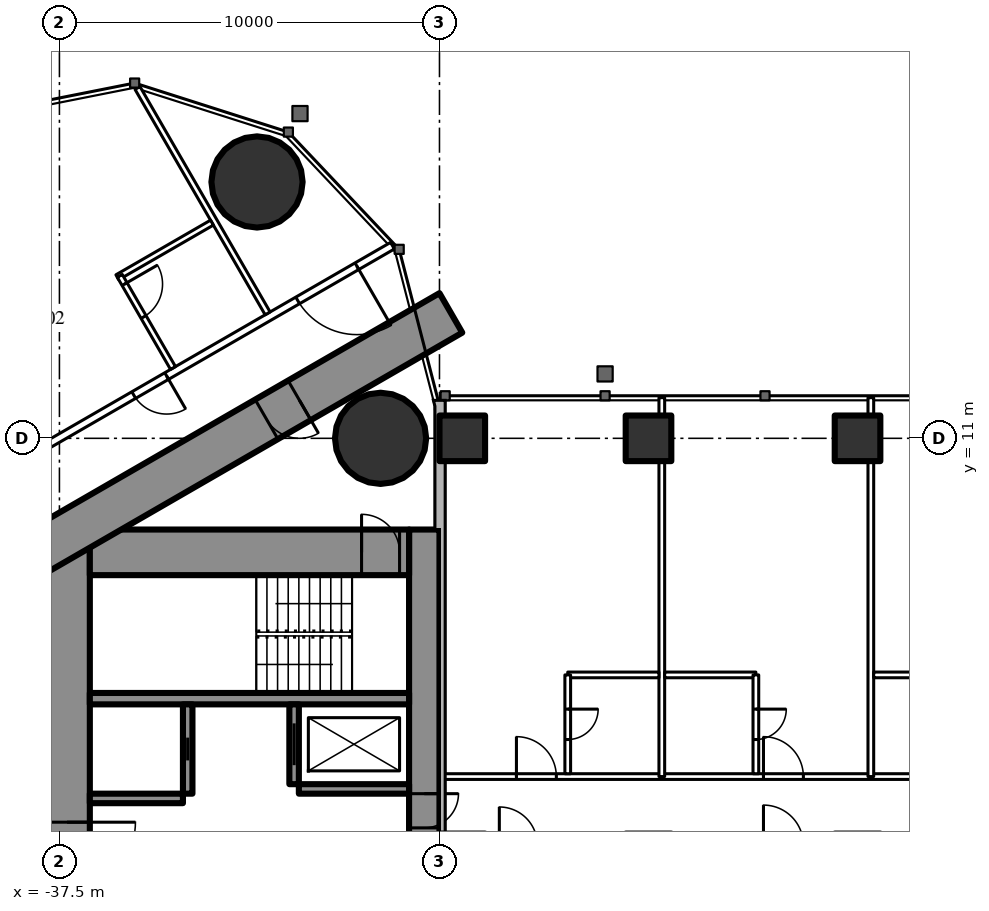
"""IFC4 building model, lengths in metres.
Left out: names, types, materials, properties, quantities, classifications, styles, units other than length and angle.
Written with IfcOpenShell. Run it as: python <this file> out.ifc"""

import sys

from ifc_helpers import new_model, si_unit, direction, frame, frame_2d, origin, origin_2d, place, context, subcontext, project, spatial, rectangle, hollow_rectangle, circle, extrude, element, fill, save


model = new_model("IFC4")
c1 = context("Model", 3, precision=1e-05, world=origin(), true_north=direction((0.0, 1.0)))
c2 = subcontext(c1, "Body", "Model", "MODEL_VIEW")
j1 = project(units=[si_unit("LENGTHUNIT", "METRE"), si_unit("PLANEANGLEUNIT", "RADIAN")], contexts=[c1])
p1 = place(None, origin())
s1 = spatial("IfcSite", under=j1, at=p1, CompositionType="ELEMENT")
p2 = place(p1, origin())
s2 = spatial("IfcBuilding", under=s1, at=p2, CompositionType="ELEMENT")
p3 = place(p2, frame((0.0, 0.0, 215.3)))
s3 = spatial("IfcBuildingStorey", under=s2, at=p3, CompositionType="ELEMENT", Elevation=215.3)
for number, where, z_axis, x_axis in (
    (1, (-32.301, 17.745, 0.0), (0.0, 0.0, 1.0), (1.0, 0.0, 0.0)),
    (2, (-29.05, 11.0, 0.0), (0.0, 0.0, 1.0), (1.0, 0.0, 0.0)),
):
    element("IfcColumn", number, at=place(p3, frame(where, z_axis=z_axis, x_axis=x_axis)), inside=s3, PredefinedType="COLUMN", context=c2, shape_type="SweptSolid", body=[
        extrude(circle(Radius=1.2, at=origin_2d()), origin(), (0.0, 0.0, 1.0), 3.6),
    ])
p4 = place(p3, frame((-27.9, 8.6, 0.0), z_axis=(0.0, 0.0, 1.0), x_axis=(0.0, -1.0, 0.0)))
e3 = element("IfcWall", 3, at=p4, inside=s3, PredefinedType="SHEAR", context=c2, shape_type="SweptSolid", body=[
    extrude(rectangle(XDim=17.2, YDim=0.8, at=frame_2d((8.6, 0.0))), origin(), (0.0, 0.0, 1.0), 3.6),
])
p5 = place(p4, frame((6.95, 0.0, 0.0)))
e4 = element("IfcOpeningElement", 4, at=p5, cuts=e3, PredefinedType="OPENING", context=c2, shape_type="SweptSolid", body=[
    extrude(rectangle(XDim=0.9, YDim=2.2, at=frame_2d((0.45, 1.1))), frame((0.0, 0.41, 0.0), z_axis=(0.0, -1.0, 0.0), x_axis=(1.0, 0.0, 0.0)), (0.0, 0.0, 1.0), 0.82),
])
p6 = place(p3, frame((-37.3, 8.6, 0.0), z_axis=(0.0, 0.0, 1.0), x_axis=(0.0, -1.0, 0.0)))
e5 = element("IfcWall", 5, at=p6, inside=s3, PredefinedType="SHEAR", context=c2, shape_type="SweptSolid", body=[
    extrude(rectangle(XDim=17.2, YDim=1.2, at=frame_2d((8.6, 0.0))), origin(), (0.0, 0.0, 1.0), 3.6),
])
p7 = place(p6, frame((7.7, 0.0, 0.0)))
e6 = element("IfcOpeningElement", 6, at=p7, cuts=e5, PredefinedType="OPENING", context=c2, shape_type="SweptSolid", body=[
    extrude(rectangle(XDim=1.8, YDim=2.2, at=frame_2d((0.9, 1.1))), frame((0.0, 0.61, 0.0), z_axis=(0.0, -1.0, 0.0), x_axis=(1.0, 0.0, 0.0)), (0.0, 0.0, 1.0), 1.22),
])
p8 = place(p3, frame((-28.3, 8.0, 0.0), z_axis=(0.0, 0.0, 1.0), x_axis=(-1.0, 0.0, 0.0)))
e7 = element("IfcWall", 7, at=p8, inside=s3, PredefinedType="SHEAR", context=c2, shape_type="SweptSolid", body=[
    extrude(rectangle(XDim=8.4, YDim=1.2, at=frame_2d((4.2, 0.0))), origin(), (0.0, 0.0, 1.0), 3.6),
])
p9 = place(p8, frame((0.25, 0.0, 0.0)))
e8 = element("IfcOpeningElement", 8, at=p9, cuts=e7, PredefinedType="OPENING", context=c2, shape_type="SweptSolid", body=[
    extrude(rectangle(XDim=1.0, YDim=2.2, at=frame_2d((0.5, 1.1))), frame((0.0, 0.61, 0.0), z_axis=(0.0, -1.0, 0.0), x_axis=(1.0, 0.0, 0.0)), (0.0, 0.0, 1.0), 1.22),
])
p10 = place(p3, frame((-28.3, 4.15, 0.0), z_axis=(0.0, 0.0, 1.0), x_axis=(-1.0, 0.0, 0.0)))
e9 = element("IfcWall", 9, at=p10, inside=s3, PredefinedType="SHEAR", context=c2, shape_type="SweptSolid", body=[
    extrude(rectangle(XDim=8.4, YDim=0.3, at=frame_2d((4.2, 0.0))), origin(), (0.0, 0.0, 1.0), 3.6),
])
p11 = place(p3, frame((-31.325, 4.0, 0.0), z_axis=(0.0, 0.0, 1.0), x_axis=(0.0, -1.0, 0.0)))
e10 = element("IfcWall", 10, at=p11, inside=s3, PredefinedType="SHEAR", context=c2, shape_type="SweptSolid", body=[
    extrude(rectangle(XDim=2.1, YDim=0.25, at=frame_2d((1.05, 0.0))), origin(), (0.0, 0.0, 1.0), 3.6),
])
p12 = place(p11, frame((0.5, 0.0, 0.0)))
e11 = element("IfcOpeningElement", 11, at=p12, cuts=e10, PredefinedType="OPENING", context=c2, shape_type="SweptSolid", body=[
    extrude(rectangle(XDim=1.1, YDim=2.2, at=frame_2d((0.55, 1.1))), frame((0.0, 0.135, 0.0), z_axis=(0.0, -1.0, 0.0), x_axis=(1.0, 0.0, 0.0)), (0.0, 0.0, 1.0), 0.27),
])
p13 = place(p3, frame((-34.125, 4.0, 0.0), z_axis=(0.0, 0.0, 1.0), x_axis=(0.0, -1.0, 0.0)))
e12 = element("IfcWall", 12, at=p13, inside=s3, PredefinedType="SHEAR", context=c2, shape_type="SweptSolid", body=[
    extrude(rectangle(XDim=2.35, YDim=0.25, at=frame_2d((1.175, 0.0))), origin(), (0.0, 0.0, 1.0), 3.6),
])
p14 = place(p13, frame((0.875, 0.0, 0.0)))
e13 = element("IfcOpeningElement", 13, at=p14, cuts=e12, PredefinedType="OPENING", context=c2, shape_type="SweptSolid", body=[
    extrude(rectangle(XDim=0.6, YDim=2.0, at=frame_2d((0.3, 1.0))), frame((0.0, 0.135, 0.0), z_axis=(0.0, -1.0, 0.0), x_axis=(1.0, 0.0, 0.0)), (0.0, 0.0, 1.0), 0.27),
])
p15 = place(p3, frame((-28.3, 1.775, 0.0), z_axis=(0.0, 0.0, 1.0), x_axis=(-1.0, 0.0, 0.0)))
e14 = element("IfcWall", 14, at=p15, inside=s3, PredefinedType="SHEAR", context=c2, shape_type="SweptSolid", body=[
    extrude(rectangle(XDim=2.9, YDim=0.25, at=frame_2d((1.45, 0.0))), origin(), (0.0, 0.0, 1.0), 3.6),
])
p16 = place(p3, frame((-34.25, 1.525, 0.0), z_axis=(0.0, 0.0, 1.0), x_axis=(-1.0, 0.0, 0.0)))
e15 = element("IfcWall", 15, at=p16, inside=s3, PredefinedType="SHEAR", context=c2, shape_type="SweptSolid", body=[
    extrude(rectangle(XDim=2.45, YDim=0.25, at=frame_2d((1.225, 0.0))), origin(), (0.0, 0.0, 1.0), 3.6),
])
p17 = place(p3, frame((-27.2, 14.3, 0.0), z_axis=(0.0, 0.0, 1.0), x_axis=(-0.866026593062, -0.499997940104, 0.0)))
e16 = element("IfcWall", 16, at=p17, inside=s3, PredefinedType="SHEAR", context=c2, shape_type="SweptSolid", body=[
    extrude(rectangle(XDim=28.946, YDim=1.2, at=frame_2d((14.473, 0.0))), origin(), (0.0, 0.0, 1.0), 3.6),
])
p18 = place(p17, frame((4.6, 0.0, 0.0)))
e17 = element("IfcOpeningElement", 17, at=p18, cuts=e16, PredefinedType="OPENING", context=c2, shape_type="SweptSolid", body=[
    extrude(rectangle(XDim=1.0, YDim=2.2, at=frame_2d((0.5, 1.1))), frame((0.0, 0.61, 0.0), z_axis=(0.0, -1.0, 0.0), x_axis=(1.0, 0.0, 0.0)), (0.0, 0.0, 1.0), 1.22),
])
p19 = place(p17, frame((13.395, 0.0, 0.0)))
e18 = element("IfcOpeningElement", 18, at=p19, cuts=e16, PredefinedType="OPENING", context=c2, shape_type="SweptSolid", body=[
    extrude(rectangle(XDim=1.8, YDim=2.2, at=frame_2d((0.9, 1.1))), frame((0.0, 0.61, 0.0), z_axis=(0.0, -1.0, 0.0), x_axis=(1.0, 0.0, 0.0)), (0.0, 0.0, 1.0), 1.22),
])
for number, where, z_axis, x_axis in (
    (19, (-26.9, 11.0, 0.0), (0.0, 0.0, 1.0), (1.0, 0.0, 0.0)),
    (20, (-22.0, 11.0, 0.0), (0.0, 0.0, 1.0), (1.0, 0.0, 0.0)),
    (21, (-16.5, 11.0, 0.0), (0.0, 0.0, 1.0), (1.0, 0.0, 0.0)),
):
    element("IfcColumn", number, at=place(p3, frame(where, z_axis=z_axis, x_axis=x_axis)), inside=s3, PredefinedType="COLUMN", context=c2, shape_type="SweptSolid", body=[
        extrude(hollow_rectangle(XDim=1.2, YDim=1.2, WallThickness=0.12, at=origin_2d()), origin(), (0.0, 0.0, 1.0), 3.6),
    ])
p20 = place(p3, frame((-28.737, 16.068, 0.0), z_axis=(0.0, 0.0, 1.0), x_axis=(-0.866026057212, -0.499998868229, 0.0)))
e22 = element("IfcWall", 22, at=p20, inside=s3, PredefinedType="PARTITIONING", context=c2, shape_type="SweptSolid", body=[
    extrude(rectangle(XDim=32.137, YDim=0.2, at=frame_2d((16.068, 0.0))), origin(), (0.0, 0.0, 1.0), 3.35),
])
p21 = place(p20, frame((1.08, 0.0, 0.0)))
e23 = element("IfcOpeningElement", 23, at=p21, cuts=e22, PredefinedType="OPENING", context=c2, shape_type="SweptSolid", body=[
    extrude(rectangle(XDim=1.8, YDim=2.03, at=frame_2d((0.9, 1.015))), frame((0.0, 0.11, 0.0), z_axis=(0.0, -1.0, 0.0), x_axis=(1.0, 0.0, 0.0)), (0.0, 0.0, 1.0), 0.22),
])
p22 = place(p20, frame((6.86, 0.0, 0.0)))
e24 = element("IfcOpeningElement", 24, at=p22, cuts=e22, PredefinedType="OPENING", context=c2, shape_type="SweptSolid", body=[
    extrude(rectangle(XDim=1.0, YDim=2.2, at=frame_2d((0.5, 1.1))), frame((0.0, 0.11, 0.0), z_axis=(0.0, -1.0, 0.0), x_axis=(1.0, 0.0, 0.0)), (0.0, 0.0, 1.0), 0.22),
])
p23 = place(p20, frame((16.418, 0.0, 0.0)))
e25 = element("IfcOpeningElement", 25, at=p23, cuts=e22, PredefinedType="OPENING", context=c2, shape_type="SweptSolid", body=[
    extrude(rectangle(XDim=0.95, YDim=2.2, at=frame_2d((0.475, 1.1))), frame((0.0, 0.11, 0.0), z_axis=(0.0, -1.0, 0.0), x_axis=(1.0, 0.0, 0.0)), (0.0, 0.0, 1.0), 0.22),
])
p24 = place(p20, frame((20.567, 0.0, 0.0)))
e26 = element("IfcOpeningElement", 26, at=p24, cuts=e22, PredefinedType="OPENING", context=c2, shape_type="SweptSolid", body=[
    extrude(rectangle(XDim=0.95, YDim=2.2, at=frame_2d((0.475, 1.1))), frame((0.0, 0.11, 0.0), z_axis=(0.0, -1.0, 0.0), x_axis=(1.0, 0.0, 0.0)), (0.0, 0.0, 1.0), 0.22),
])
p25 = place(p20, frame((27.065, 0.0, 0.0)))
e27 = element("IfcOpeningElement", 27, at=p25, cuts=e22, PredefinedType="OPENING", context=c2, shape_type="SweptSolid", body=[
    extrude(rectangle(XDim=0.95, YDim=2.2, at=frame_2d((0.475, 1.1))), frame((0.0, 0.11, 0.0), z_axis=(0.0, -1.0, 0.0), x_axis=(1.0, 0.0, 0.0)), (0.0, 0.0, 1.0), 0.22),
])
p26 = place(p3, frame((-32.022, 14.287, 0.0), z_axis=(0.0, 0.0, 1.0), x_axis=(-0.50000019414, 0.866025291697, 0.0)))
e28 = element("IfcWall", 28, at=p26, inside=s3, PredefinedType="PARTITIONING", context=c2, shape_type="SweptSolid", body=[
    extrude(rectangle(XDim=6.848, YDim=0.15, at=frame_2d((3.424, 0.0))), origin(), (0.0, 0.0, 1.0), 3.35),
])
p27 = place(p3, frame((-33.487, 16.675, 0.0), z_axis=(0.0, 0.0, 1.0), x_axis=(-0.866039941686, -0.499974818771, 0.0)))
e29 = element("IfcWall", 29, at=p27, inside=s3, PredefinedType="PARTITIONING", context=c2, shape_type="SweptSolid", body=[
    extrude(rectangle(XDim=2.875, YDim=0.15, at=frame_2d((1.438, 0.0))), origin(), (0.0, 0.0, 1.0), 3.35),
])
p28 = place(p3, frame((-34.511, 12.85, 0.0), z_axis=(0.0, 0.0, 1.0), x_axis=(-0.500011755427, 0.866018616679, 0.0)))
e30 = element("IfcWall", 30, at=p28, inside=s3, PredefinedType="PARTITIONING", context=c2, shape_type="SweptSolid", body=[
    extrude(rectangle(XDim=2.8, YDim=0.15, at=frame_2d((1.4, 0.0))), origin(), (0.0, 0.0, 1.0), 3.35),
])
p29 = place(p28, frame((1.55, 0.0, 0.0)))
e31 = element("IfcOpeningElement", 31, at=p29, cuts=e30, PredefinedType="OPENING", context=c2, shape_type="SweptSolid", body=[
    extrude(rectangle(XDim=1.0, YDim=2.2, at=frame_2d((0.5, 1.1))), frame((0.0, 0.085, 0.0), z_axis=(0.0, -1.0, 0.0), x_axis=(1.0, 0.0, 0.0)), (0.0, 0.0, 1.0), 0.17),
])
p30 = place(p3, frame((-27.5, 2.1, 0.0), z_axis=(0.0, 0.0, 1.0), x_axis=(1.0, 0.0, 0.0)))
e32 = element("IfcWall", 32, at=p30, inside=s3, PredefinedType="PARTITIONING", context=c2, shape_type="SweptSolid", body=[
    extrude(rectangle(XDim=55.0, YDim=0.15, at=frame_2d((27.5, 0.0))), origin(), (0.0, 0.0, 1.0), 3.4),
])
p31 = place(p30, frame((2.025, 0.0, 0.0)))
e33 = element("IfcOpeningElement", 33, at=p31, cuts=e32, PredefinedType="OPENING", context=c2, shape_type="SweptSolid", body=[
    extrude(rectangle(XDim=1.05, YDim=2.4, at=frame_2d((0.525, 1.2))), frame((0.0, 0.085, 0.0), z_axis=(0.0, -1.0, 0.0), x_axis=(1.0, 0.0, 0.0)), (0.0, 0.0, 1.0), 0.17),
])
p32 = place(p30, frame((8.525, 0.0, 0.0)))
e34 = element("IfcOpeningElement", 34, at=p32, cuts=e32, PredefinedType="OPENING", context=c2, shape_type="SweptSolid", body=[
    extrude(rectangle(XDim=1.05, YDim=2.4, at=frame_2d((0.525, 1.2))), frame((0.0, 0.085, 0.0), z_axis=(0.0, -1.0, 0.0), x_axis=(1.0, 0.0, 0.0)), (0.0, 0.0, 1.0), 0.17),
])
p33 = place(p30, frame((14.025, 0.0, 0.0)))
e35 = element("IfcOpeningElement", 35, at=p33, cuts=e32, PredefinedType="OPENING", context=c2, shape_type="SweptSolid", body=[
    extrude(rectangle(XDim=1.05, YDim=2.4, at=frame_2d((0.525, 1.2))), frame((0.0, 0.085, 0.0), z_axis=(0.0, -1.0, 0.0), x_axis=(1.0, 0.0, 0.0)), (0.0, 0.0, 1.0), 0.17),
])
p34 = place(p30, frame((19.525, 0.0, 0.0)))
e36 = element("IfcOpeningElement", 36, at=p34, cuts=e32, PredefinedType="OPENING", context=c2, shape_type="SweptSolid", body=[
    extrude(rectangle(XDim=1.05, YDim=2.4, at=frame_2d((0.525, 1.2))), frame((0.0, 0.085, 0.0), z_axis=(0.0, -1.0, 0.0), x_axis=(1.0, 0.0, 0.0)), (0.0, 0.0, 1.0), 0.17),
])
p35 = place(p30, frame((25.025, 0.0, 0.0)))
e37 = element("IfcOpeningElement", 37, at=p35, cuts=e32, PredefinedType="OPENING", context=c2, shape_type="SweptSolid", body=[
    extrude(rectangle(XDim=1.05, YDim=2.4, at=frame_2d((0.525, 1.2))), frame((0.0, 0.085, 0.0), z_axis=(0.0, -1.0, 0.0), x_axis=(1.0, 0.0, 0.0)), (0.0, 0.0, 1.0), 0.17),
])
p36 = place(p30, frame((30.525, 0.0, 0.0)))
e38 = element("IfcOpeningElement", 38, at=p36, cuts=e32, PredefinedType="OPENING", context=c2, shape_type="SweptSolid", body=[
    extrude(rectangle(XDim=1.05, YDim=2.4, at=frame_2d((0.525, 1.2))), frame((0.0, 0.085, 0.0), z_axis=(0.0, -1.0, 0.0), x_axis=(1.0, 0.0, 0.0)), (0.0, 0.0, 1.0), 0.17),
])
p37 = place(p30, frame((36.025, 0.0, 0.0)))
e39 = element("IfcOpeningElement", 39, at=p37, cuts=e32, PredefinedType="OPENING", context=c2, shape_type="SweptSolid", body=[
    extrude(rectangle(XDim=1.05, YDim=2.4, at=frame_2d((0.525, 1.2))), frame((0.0, 0.085, 0.0), z_axis=(0.0, -1.0, 0.0), x_axis=(1.0, 0.0, 0.0)), (0.0, 0.0, 1.0), 0.17),
])
p38 = place(p30, frame((41.525, 0.0, 0.0)))
e40 = element("IfcOpeningElement", 40, at=p38, cuts=e32, PredefinedType="OPENING", context=c2, shape_type="SweptSolid", body=[
    extrude(rectangle(XDim=1.05, YDim=2.4, at=frame_2d((0.525, 1.2))), frame((0.0, 0.085, 0.0), z_axis=(0.0, -1.0, 0.0), x_axis=(1.0, 0.0, 0.0)), (0.0, 0.0, 1.0), 0.17),
])
p39 = place(p30, frame((47.025, 0.0, 0.0)))
e41 = element("IfcOpeningElement", 41, at=p39, cuts=e32, PredefinedType="OPENING", context=c2, shape_type="SweptSolid", body=[
    extrude(rectangle(XDim=1.05, YDim=2.4, at=frame_2d((0.525, 1.2))), frame((0.0, 0.085, 0.0), z_axis=(0.0, -1.0, 0.0), x_axis=(1.0, 0.0, 0.0)), (0.0, 0.0, 1.0), 0.17),
])
p40 = place(p30, frame((52.525, 0.0, 0.0)))
e42 = element("IfcOpeningElement", 42, at=p40, cuts=e32, PredefinedType="OPENING", context=c2, shape_type="SweptSolid", body=[
    extrude(rectangle(XDim=1.05, YDim=2.4, at=frame_2d((0.525, 1.2))), frame((0.0, 0.085, 0.0), z_axis=(0.0, -1.0, 0.0), x_axis=(1.0, 0.0, 0.0)), (0.0, 0.0, 1.0), 0.17),
])
for number, where, z_axis, x_axis in (
    (43, (-21.65, 2.1, 0.0), (0.0, 0.0, 1.0), (0.0, 1.0, 0.0)),
    (44, (-16.15, 2.1, 0.0), (0.0, 0.0, 1.0), (0.0, 1.0, 0.0)),
):
    element("IfcWall", number, at=place(p3, frame(where, z_axis=z_axis, x_axis=x_axis)), inside=s3, PredefinedType="PARTITIONING", context=c2, shape_type="SweptSolid", body=[
        extrude(rectangle(XDim=9.97, YDim=0.15, at=frame_2d((4.985, 0.0))), origin(), (0.0, 0.0, 1.0), 3.4),
    ])
p41 = place(p3, frame((-24.125, 4.775, 0.0), z_axis=(0.0, 0.0, 1.0), x_axis=(1.0, 0.0, 0.0)))
e45 = element("IfcWall", 45, at=p41, inside=s3, PredefinedType="PARTITIONING", context=c2, shape_type="SweptSolid", body=[
    extrude(rectangle(XDim=2.4, YDim=0.15, at=frame_2d((1.2, 0.0))), origin(), (0.0, 0.0, 1.0), 3.4),
])
p42 = place(p3, frame((-24.125, 2.175, 0.0), z_axis=(0.0, 0.0, 1.0), x_axis=(0.0, 1.0, 0.0)))
e46 = element("IfcWall", 46, at=p42, inside=s3, PredefinedType="PARTITIONING", context=c2, shape_type="SweptSolid", body=[
    extrude(rectangle(XDim=2.6, YDim=0.15, at=frame_2d((1.3, 0.0))), origin(), (0.0, 0.0, 1.0), 3.4),
])
p43 = place(p42, frame((0.9, 0.0, 0.0)))
e47 = element("IfcOpeningElement", 47, at=p43, cuts=e46, PredefinedType="OPENING", context=c2, shape_type="SweptSolid", body=[
    extrude(rectangle(XDim=0.8, YDim=2.2, at=frame_2d((0.4, 1.1))), frame((0.0, 0.085, 0.0), z_axis=(0.0, -1.0, 0.0), x_axis=(1.0, 0.0, 0.0)), (0.0, 0.0, 1.0), 0.17),
])
p44 = place(p3, frame((-21.575, 4.775, 0.0), z_axis=(0.0, 0.0, 1.0), x_axis=(1.0, 0.0, 0.0)))
e48 = element("IfcWall", 48, at=p44, inside=s3, PredefinedType="PARTITIONING", context=c2, shape_type="SweptSolid", body=[
    extrude(rectangle(XDim=2.4, YDim=0.15, at=frame_2d((1.2, 0.0))), origin(), (0.0, 0.0, 1.0), 3.4),
])
p45 = place(p3, frame((-19.175, 2.175, 0.0), z_axis=(0.0, 0.0, 1.0), x_axis=(0.0, 1.0, 0.0)))
e49 = element("IfcWall", 49, at=p45, inside=s3, PredefinedType="PARTITIONING", context=c2, shape_type="SweptSolid", body=[
    extrude(rectangle(XDim=2.6, YDim=0.15, at=frame_2d((1.3, 0.0))), origin(), (0.0, 0.0, 1.0), 3.4),
])
p46 = place(p45, frame((0.9, 0.0, 0.0)))
e50 = element("IfcOpeningElement", 50, at=p46, cuts=e49, PredefinedType="OPENING", context=c2, shape_type="SweptSolid", body=[
    extrude(rectangle(XDim=0.8, YDim=2.2, at=frame_2d((0.4, 1.1))), frame((0.0, 0.085, 0.0), z_axis=(0.0, -1.0, 0.0), x_axis=(1.0, 0.0, 0.0)), (0.0, 0.0, 1.0), 0.17),
])
p47 = place(p3, frame((-16.075, 4.775, 0.0), z_axis=(0.0, 0.0, 1.0), x_axis=(1.0, 0.0, 0.0)))
e51 = element("IfcWall", 51, at=p47, inside=s3, PredefinedType="PARTITIONING", context=c2, shape_type="SweptSolid", body=[
    extrude(rectangle(XDim=2.4, YDim=0.15, at=frame_2d((1.2, 0.0))), origin(), (0.0, 0.0, 1.0), 3.4),
])
p48 = place(p21, origin())
e52 = element("IfcDoor", 52, at=p48, inside=s3, OperationType="DOUBLE_DOOR_SINGLE_SWING", PredefinedType="DOOR", context=c2, shape_type="SweptSolid", body=[
    extrude(rectangle(XDim=1.8, YDim=2.03, at=frame_2d((0.9, 1.015))), frame((0.0, 0.025, 0.0), z_axis=(0.0, -1.0, 0.0), x_axis=(1.0, 0.0, 0.0)), (0.0, 0.0, 1.0), 0.05),
])
fill(e23, e52)
p49 = place(p29, origin())
e53 = element("IfcDoor", 53, at=p49, inside=s3, OperationType="SINGLE_SWING_RIGHT", PredefinedType="DOOR", context=c2, shape_type="SweptSolid", body=[
    extrude(rectangle(XDim=1.0, YDim=2.2, at=frame_2d((0.5, 1.1))), frame((0.0, 0.025, 0.0), z_axis=(0.0, -1.0, 0.0), x_axis=(1.0, 0.0, 0.0)), (0.0, 0.0, 1.0), 0.05),
])
fill(e31, e53)
p50 = place(p22, origin())
e54 = element("IfcDoor", 54, at=p50, inside=s3, OperationType="SINGLE_SWING_LEFT", PredefinedType="DOOR", context=c2, shape_type="SweptSolid", body=[
    extrude(rectangle(XDim=1.0, YDim=2.2, at=frame_2d((0.5, 1.1))), frame((0.0, 0.025, 0.0), z_axis=(0.0, -1.0, 0.0), x_axis=(1.0, 0.0, 0.0)), (0.0, 0.0, 1.0), 0.05),
])
fill(e24, e54)
p51 = place(p18, origin())
e55 = element("IfcDoor", 55, at=p51, inside=s3, OperationType="SINGLE_SWING_LEFT", PredefinedType="DOOR", context=c2, shape_type="SweptSolid", body=[
    extrude(rectangle(XDim=1.0, YDim=2.2, at=frame_2d((0.5, 1.1))), frame((0.0, 0.025, 0.0), z_axis=(0.0, -1.0, 0.0), x_axis=(1.0, 0.0, 0.0)), (0.0, 0.0, 1.0), 0.05),
])
fill(e17, e55)
p52 = place(p7, origin())
e56 = element("IfcDoor", 56, at=p52, inside=s3, OperationType="DOUBLE_DOOR_SINGLE_SWING", PredefinedType="DOOR", context=c2, shape_type="SweptSolid", body=[
    extrude(rectangle(XDim=1.8, YDim=2.2, at=frame_2d((0.9, 1.1))), frame((0.0, 0.025, 0.0), z_axis=(0.0, -1.0, 0.0), x_axis=(1.0, 0.0, 0.0)), (0.0, 0.0, 1.0), 0.05),
])
fill(e6, e56)
p53 = place(p9, origin())
e57 = element("IfcDoor", 57, at=p53, inside=s3, OperationType="SINGLE_SWING_RIGHT", PredefinedType="DOOR", context=c2, shape_type="SweptSolid", body=[
    extrude(rectangle(XDim=1.0, YDim=2.2, at=frame_2d((0.5, 1.1))), frame((0.0, 0.025, 0.0), z_axis=(0.0, -1.0, 0.0), x_axis=(1.0, 0.0, 0.0)), (0.0, 0.0, 1.0), 0.05),
])
fill(e8, e57)
p54 = place(p5, origin())
e58 = element("IfcDoor", 58, at=p54, inside=s3, OperationType="SINGLE_SWING_LEFT", PredefinedType="DOOR", context=c2, shape_type="SweptSolid", body=[
    extrude(rectangle(XDim=0.9, YDim=2.2, at=frame_2d((0.45, 1.1))), frame((0.0, 0.025, 0.0), z_axis=(0.0, -1.0, 0.0), x_axis=(1.0, 0.0, 0.0)), (0.0, 0.0, 1.0), 0.05),
])
fill(e4, e58)
p55 = place(p43, origin())
e59 = element("IfcDoor", 59, at=p55, inside=s3, OperationType="SINGLE_SWING_RIGHT", PredefinedType="DOOR", context=c2, shape_type="SweptSolid", body=[
    extrude(rectangle(XDim=0.8, YDim=2.2, at=frame_2d((0.4, 1.1))), frame((0.0, 0.025, 0.0), z_axis=(0.0, -1.0, 0.0), x_axis=(1.0, 0.0, 0.0)), (0.0, 0.0, 1.0), 0.05),
])
fill(e47, e59)
p56 = place(p31, origin())
e60 = element("IfcDoor", 60, at=p56, inside=s3, OperationType="SINGLE_SWING_LEFT", PredefinedType="DOOR", context=c2, shape_type="SweptSolid", body=[
    extrude(rectangle(XDim=1.05, YDim=2.4, at=frame_2d((0.525, 1.2))), frame((0.0, 0.025, 0.0), z_axis=(0.0, -1.0, 0.0), x_axis=(1.0, 0.0, 0.0)), (0.0, 0.0, 1.0), 0.05),
])
fill(e33, e60)
p57 = place(p46, origin())
e61 = element("IfcDoor", 61, at=p57, inside=s3, OperationType="SINGLE_SWING_RIGHT", PredefinedType="DOOR", context=c2, shape_type="SweptSolid", body=[
    extrude(rectangle(XDim=0.8, YDim=2.2, at=frame_2d((0.4, 1.1))), frame((0.0, 0.025, 0.0), z_axis=(0.0, -1.0, 0.0), x_axis=(1.0, 0.0, 0.0)), (0.0, 0.0, 1.0), 0.05),
])
fill(e50, e61)
p58 = place(p32, origin())
e62 = element("IfcDoor", 62, at=p58, inside=s3, OperationType="SINGLE_SWING_LEFT", PredefinedType="DOOR", context=c2, shape_type="SweptSolid", body=[
    extrude(rectangle(XDim=1.05, YDim=2.4, at=frame_2d((0.525, 1.2))), frame((0.0, 0.025, 0.0), z_axis=(0.0, -1.0, 0.0), x_axis=(1.0, 0.0, 0.0)), (0.0, 0.0, 1.0), 0.05),
])
fill(e34, e62)
p59 = place(p12, origin())
e63 = element("IfcDoor", 63, at=p59, inside=s3, OperationType="SLIDING_TO_LEFT", PredefinedType="USERDEFINED", context=c2, shape_type="SweptSolid", body=[
    extrude(rectangle(XDim=1.1, YDim=2.2, at=frame_2d((0.55, 1.1))), frame((0.0, 0.025, 0.0), z_axis=(0.0, -1.0, 0.0), x_axis=(1.0, 0.0, 0.0)), (0.0, 0.0, 1.0), 0.05),
])
fill(e11, e63)
p60 = place(p14, origin())
e64 = element("IfcDoor", 64, at=p60, inside=s3, OperationType="SLIDING_TO_LEFT", PredefinedType="DOOR", context=c2, shape_type="SweptSolid", body=[
    extrude(rectangle(XDim=0.6, YDim=2.0, at=frame_2d((0.3, 1.0))), frame((0.0, 0.025, 0.0), z_axis=(0.0, -1.0, 0.0), x_axis=(1.0, 0.0, 0.0)), (0.0, 0.0, 1.0), 0.05),
])
fill(e13, e64)
save(model, sys.argv[1])
